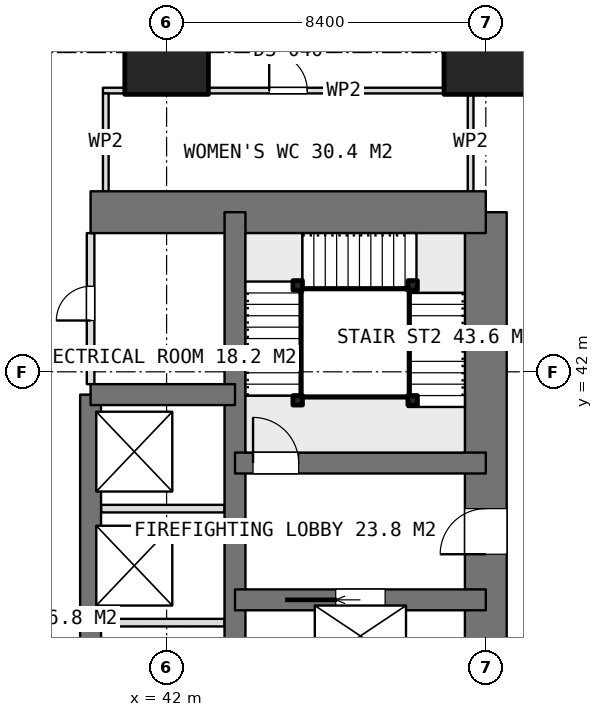
"""IFC4 building model, lengths in metres.
Left out: names, types, materials, properties, quantities, classifications, styles, units other than length and angle.
Written with IfcOpenShell. Run it as: python <this file> out.ifc"""

import sys

from ifc_helpers import new_model, si_unit, direction, frame, frame_2d, origin, origin_2d, place, context, subcontext, project, spatial, rectangle, extrude, element, fill, save


model = new_model("IFC4")
c1 = context("Model", 3, precision=1e-05, world=origin(), true_north=direction((0.0, 1.0)))
c2 = subcontext(c1, "Body", "Model", "MODEL_VIEW")
j1 = project(units=[si_unit("LENGTHUNIT", "METRE"), si_unit("PLANEANGLEUNIT", "RADIAN")], contexts=[c1])
p1 = place(None, origin())
s1 = spatial("IfcSite", under=j1, at=p1, CompositionType="ELEMENT")
p2 = place(p1, origin())
s2 = spatial("IfcBuilding", under=s1, at=p2, CompositionType="ELEMENT")
p3 = place(p2, frame((0.0, 0.0, 32.9)))
s3 = spatial("IfcBuildingStorey", under=s2, at=p3, CompositionType="ELEMENT", Elevation=32.9)
p4 = place(p3, frame((40.0, 46.2, 0.0), z_axis=(0.0, 0.0, 1.0), x_axis=(1.0, 0.0, 0.0)))
e1 = element("IfcWall", 1, at=p4, inside=s3, PredefinedType="SHEAR", context=c2, shape_type="SweptSolid", body=[
    extrude(rectangle(XDim=10.4, YDim=1.1, at=frame_2d((5.2, 0.0))), origin(), (0.0, 0.0, 1.0), 3.75),
])
p5 = place(p3, frame((50.4, 21.0, 0.0), z_axis=(0.0, 0.0, 1.0), x_axis=(0.0, 1.0, 0.0)))
e2 = element("IfcWall", 2, at=p5, inside=s3, PredefinedType="SHEAR", context=c2, shape_type="SweptSolid", body=[
    extrude(rectangle(XDim=25.2, YDim=1.1, at=frame_2d((12.6, 0.0))), origin(), (0.0, 0.0, 1.0), 3.75),
])
p6 = place(p5, frame((16.2, 0.0, 0.0)))
e3 = element("IfcOpeningElement", 3, at=p6, cuts=e2, PredefinedType="OPENING", context=c2, shape_type="SweptSolid", body=[
    extrude(rectangle(XDim=1.2, YDim=2.1, at=frame_2d((0.6, 1.05))), frame((0.0, 0.56, 0.0), z_axis=(0.0, -1.0, 0.0), x_axis=(1.0, 0.0, 0.0)), (0.0, 0.0, 1.0), 1.12),
])
p7 = place(p5, frame((10.05, 0.0, 0.0)))
e4 = element("IfcOpeningElement", 4, at=p7, cuts=e2, PredefinedType="OPENING", context=c2, shape_type="SweptSolid", body=[
    extrude(rectangle(XDim=0.9, YDim=2.1, at=frame_2d((0.45, 1.05))), frame((0.0, 0.56, 0.0), z_axis=(0.0, -1.0, 0.0), x_axis=(1.0, 0.0, 0.0)), (0.0, 0.0, 1.0), 1.12),
])
p8 = place(p5, frame((7.45, 0.0, 0.0)))
e5 = element("IfcOpeningElement", 5, at=p8, cuts=e2, PredefinedType="OPENING", context=c2, shape_type="SweptSolid", body=[
    extrude(rectangle(XDim=0.9, YDim=2.1, at=frame_2d((0.45, 1.05))), frame((0.0, 0.56, 0.0), z_axis=(0.0, -1.0, 0.0), x_axis=(1.0, 0.0, 0.0)), (0.0, 0.0, 1.0), 1.12),
])
p9 = place(p5, frame((0.75, 0.0, 0.0)))
e6 = element("IfcOpeningElement", 6, at=p9, cuts=e2, PredefinedType="OPENING", context=c2, shape_type="SweptSolid", body=[
    extrude(rectangle(XDim=1.2, YDim=2.1, at=frame_2d((0.6, 1.05))), frame((0.0, 0.56, 0.0), z_axis=(0.0, -1.0, 0.0), x_axis=(1.0, 0.0, 0.0)), (0.0, 0.0, 1.0), 1.12),
])
p10 = place(p3, frame((43.8, 21.0, 0.0), z_axis=(0.0, 0.0, 1.0), x_axis=(0.0, 1.0, 0.0)))
e7 = element("IfcWall", 7, at=p10, inside=s3, PredefinedType="SHEAR", context=c2, shape_type="SweptSolid", body=[
    extrude(rectangle(XDim=25.2, YDim=0.55, at=frame_2d((12.6, 0.0))), origin(), (0.0, 0.0, 1.0), 3.75),
])
p11 = place(p3, frame((40.0, 23.4, 0.0), z_axis=(0.0, 0.0, 1.0), x_axis=(0.0, 1.0, 0.0)))
e8 = element("IfcWall", 8, at=p11, inside=s3, PredefinedType="SHEAR", context=c2, shape_type="SweptSolid", body=[
    extrude(rectangle(XDim=18.0, YDim=0.55, at=frame_2d((9.0, 0.0))), origin(), (0.0, 0.0, 1.0), 3.75),
])
p12 = place(p3, frame((40.0, 41.4, 0.0), z_axis=(0.0, 0.0, 1.0), x_axis=(1.0, 0.0, 0.0)))
e9 = element("IfcWall", 9, at=p12, inside=s3, PredefinedType="SHEAR", context=c2, shape_type="SweptSolid", body=[
    extrude(rectangle(XDim=3.8, YDim=0.55, at=frame_2d((1.9, 0.0))), origin(), (0.0, 0.0, 1.0), 3.75),
])
p13 = place(p3, frame((43.8, 36.0, 0.0), z_axis=(0.0, 0.0, 1.0), x_axis=(1.0, 0.0, 0.0)))
e10 = element("IfcWall", 10, at=p13, inside=s3, PredefinedType="SHEAR", context=c2, shape_type="SweptSolid", body=[
    extrude(rectangle(XDim=6.6, YDim=0.55, at=frame_2d((3.3, 0.0))), origin(), (0.0, 0.0, 1.0), 3.75),
])
p14 = place(p13, frame((2.65, 0.0, 0.0)))
e11 = element("IfcOpeningElement", 11, at=p14, cuts=e10, PredefinedType="OPENING", context=c2, shape_type="SweptSolid", body=[
    extrude(rectangle(XDim=1.3, YDim=2.1, at=frame_2d((0.65, 1.05))), frame((0.0, 0.285, 0.0), z_axis=(0.0, -1.0, 0.0), x_axis=(1.0, 0.0, 0.0)), (0.0, 0.0, 1.0), 0.57),
])
p15 = place(p3, frame((43.8, 39.6, 0.0), z_axis=(0.0, 0.0, 1.0), x_axis=(1.0, 0.0, 0.0)))
e12 = element("IfcWall", 12, at=p15, inside=s3, PredefinedType="SHEAR", context=c2, shape_type="SweptSolid", body=[
    extrude(rectangle(XDim=6.6, YDim=0.55, at=frame_2d((3.3, 0.0))), origin(), (0.0, 0.0, 1.0), 3.75),
])
p16 = place(p15, frame((0.475, 0.0, 0.0)))
e13 = element("IfcOpeningElement", 13, at=p16, cuts=e12, PredefinedType="OPENING", context=c2, shape_type="SweptSolid", body=[
    extrude(rectangle(XDim=1.2, YDim=2.1, at=frame_2d((0.6, 1.05))), frame((0.0, 0.285, 0.0), z_axis=(0.0, -1.0, 0.0), x_axis=(1.0, 0.0, 0.0)), (0.0, 0.0, 1.0), 0.57),
])
for number, where, z_axis, x_axis in (
    (14, (42.0, 50.4, 0.0), (0.0, 0.0, 1.0), (1.0, 0.0, 0.0)),
    (15, (50.4, 50.4, 0.0), (0.0, 0.0, 1.0), (1.0, 0.0, 0.0)),
):
    element("IfcColumn", number, at=place(p3, frame(where, z_axis=z_axis, x_axis=x_axis)), inside=s3, PredefinedType="COLUMN", context=c2, shape_type="SweptSolid", body=[
        extrude(rectangle(XDim=2.2, YDim=2.2, at=origin_2d()), origin(), (0.0, 0.0, 1.0), 3.75),
    ])
for number, where, z_axis, x_axis in (
    (16, (40.275, 35.4, 0.0), (0.0, 0.0, 1.0), (1.0, 0.0, 0.0)),
    (17, (40.275, 38.4, 0.0), (0.0, 0.0, 1.0), (1.0, 0.0, 0.0)),
):
    element("IfcWall", number, at=place(p3, frame(where, z_axis=z_axis, x_axis=x_axis)), inside=s3, PredefinedType="PARTITIONING", context=c2, shape_type="SweptSolid", body=[
        extrude(rectangle(XDim=3.25, YDim=0.2, at=frame_2d((1.625, 0.0))), origin(), (0.0, 0.0, 1.0), 3.5),
    ])
p17 = place(p3, frame((40.0, 41.675, 0.0), z_axis=(0.0, 0.0, 1.0), x_axis=(0.0, 1.0, 0.0)))
e18 = element("IfcWall", 18, at=p17, inside=s3, PredefinedType="PARTITIONING", context=c2, shape_type="SweptSolid", body=[
    extrude(rectangle(XDim=3.975, YDim=0.2, at=frame_2d((1.987, 0.0))), origin(), (0.0, 0.0, 1.0), 3.5),
])
p18 = place(p17, frame((1.675, 0.0, 0.0)))
e19 = element("IfcOpeningElement", 19, at=p18, cuts=e18, PredefinedType="OPENING", context=c2, shape_type="SweptSolid", body=[
    extrude(rectangle(XDim=0.9, YDim=2.1, at=frame_2d((0.45, 1.05))), frame((0.0, 0.11, 0.0), z_axis=(0.0, -1.0, 0.0), x_axis=(1.0, 0.0, 0.0)), (0.0, 0.0, 1.0), 0.22),
])
p19 = place(p3, frame((40.325, 49.4, 0.0), z_axis=(0.0, 0.0, 1.0), x_axis=(1.0, 0.0, 0.0)))
e20 = element("IfcWall", 20, at=p19, inside=s3, PredefinedType="PARTITIONING", context=c2, shape_type="SweptSolid", body=[
    extrude(rectangle(XDim=9.75, YDim=0.15, at=frame_2d((4.875, 0.0))), origin(), (0.0, 0.0, 1.0), 3.5),
])
p20 = place(p19, frame((4.375, 0.0, 0.0)))
e21 = element("IfcOpeningElement", 21, at=p20, cuts=e20, PredefinedType="OPENING", context=c2, shape_type="SweptSolid", body=[
    extrude(rectangle(XDim=1.0, YDim=2.1, at=frame_2d((0.5, 1.05))), frame((0.0, 0.085, 0.0), z_axis=(0.0, -1.0, 0.0), x_axis=(1.0, 0.0, 0.0)), (0.0, 0.0, 1.0), 0.17),
])
for number, where, z_axis, x_axis in (
    (22, (40.4, 46.75, 0.0), (0.0, 0.0, 1.0), (0.0, 1.0, 0.0)),
    (23, (50.0, 46.75, 0.0), (0.0, 0.0, 1.0), (0.0, 1.0, 0.0)),
):
    element("IfcWall", number, at=place(p3, frame(where, z_axis=z_axis, x_axis=x_axis)), inside=s3, PredefinedType="PARTITIONING", context=c2, shape_type="SweptSolid", body=[
        extrude(rectangle(XDim=2.575, YDim=0.15, at=frame_2d((1.288, 0.0))), origin(), (0.0, 0.0, 1.0), 3.5),
    ])
for number, where, z_axis, x_axis in (
    (24, (45.45, 41.25, 0.0), (0.0, 0.0, 1.0), (1.0, 0.0, 0.0)),
    (25, (45.45, 44.275, 0.0), (0.0, 0.0, 1.0), (1.0, 0.0, 0.0)),
    (26, (48.475, 44.275, 0.0), (0.0, 0.0, 1.0), (1.0, 0.0, 0.0)),
    (27, (48.475, 41.25, 0.0), (0.0, 0.0, 1.0), (1.0, 0.0, 0.0)),
):
    element("IfcColumn", number, at=place(p3, frame(where, z_axis=z_axis, x_axis=x_axis)), inside=s3, PredefinedType="COLUMN", context=c2, shape_type="SweptSolid", body=[
        extrude(rectangle(XDim=0.25, YDim=0.25, at=origin_2d()), origin(), (0.0, 0.0, 1.0), 3.75),
    ])
p21 = place(p6, origin())
e28 = element("IfcDoor", 28, at=p21, inside=s3, OperationType="SINGLE_SWING_LEFT", PredefinedType="DOOR", context=c2, shape_type="SweptSolid", body=[
    extrude(rectangle(XDim=1.2, YDim=2.1, at=frame_2d((0.6, 1.05))), frame((0.0, 0.025, 0.0), z_axis=(0.0, -1.0, 0.0), x_axis=(1.0, 0.0, 0.0)), (0.0, 0.0, 1.0), 0.05),
])
fill(e3, e28)
p22 = place(p18, origin())
e29 = element("IfcDoor", 29, at=p22, inside=s3, OperationType="SINGLE_SWING_LEFT", PredefinedType="DOOR", context=c2, shape_type="SweptSolid", body=[
    extrude(rectangle(XDim=0.9, YDim=2.1, at=frame_2d((0.45, 1.05))), frame((0.0, 0.025, 0.0), z_axis=(0.0, -1.0, 0.0), x_axis=(1.0, 0.0, 0.0)), (0.0, 0.0, 1.0), 0.05),
])
fill(e19, e29)
p23 = place(p14, origin())
e30 = element("IfcDoor", 30, at=p23, inside=s3, OperationType="SLIDING_TO_LEFT", PredefinedType="USERDEFINED", context=c2, shape_type="SweptSolid", body=[
    extrude(rectangle(XDim=1.3, YDim=2.1, at=frame_2d((0.65, 1.05))), frame((0.0, 0.025, 0.0), z_axis=(0.0, -1.0, 0.0), x_axis=(1.0, 0.0, 0.0)), (0.0, 0.0, 1.0), 0.05),
])
fill(e11, e30)
p24 = place(p20, origin())
e31 = element("IfcDoor", 31, at=p24, inside=s3, OperationType="SINGLE_SWING_LEFT", PredefinedType="DOOR", context=c2, shape_type="SweptSolid", body=[
    extrude(rectangle(XDim=1.0, YDim=2.1, at=frame_2d((0.5, 1.05))), frame((0.0, 0.025, 0.0), z_axis=(0.0, -1.0, 0.0), x_axis=(1.0, 0.0, 0.0)), (0.0, 0.0, 1.0), 0.05),
])
fill(e21, e31)
p25 = place(p16, origin())
e32 = element("IfcDoor", 32, at=p25, inside=s3, OperationType="SINGLE_SWING_RIGHT", PredefinedType="DOOR", context=c2, shape_type="SweptSolid", body=[
    extrude(rectangle(XDim=1.2, YDim=2.1, at=frame_2d((0.6, 1.05))), frame((0.0, 0.025, 0.0), z_axis=(0.0, -1.0, 0.0), x_axis=(1.0, 0.0, 0.0)), (0.0, 0.0, 1.0), 0.05),
])
fill(e13, e32)
save(model, sys.argv[1])
